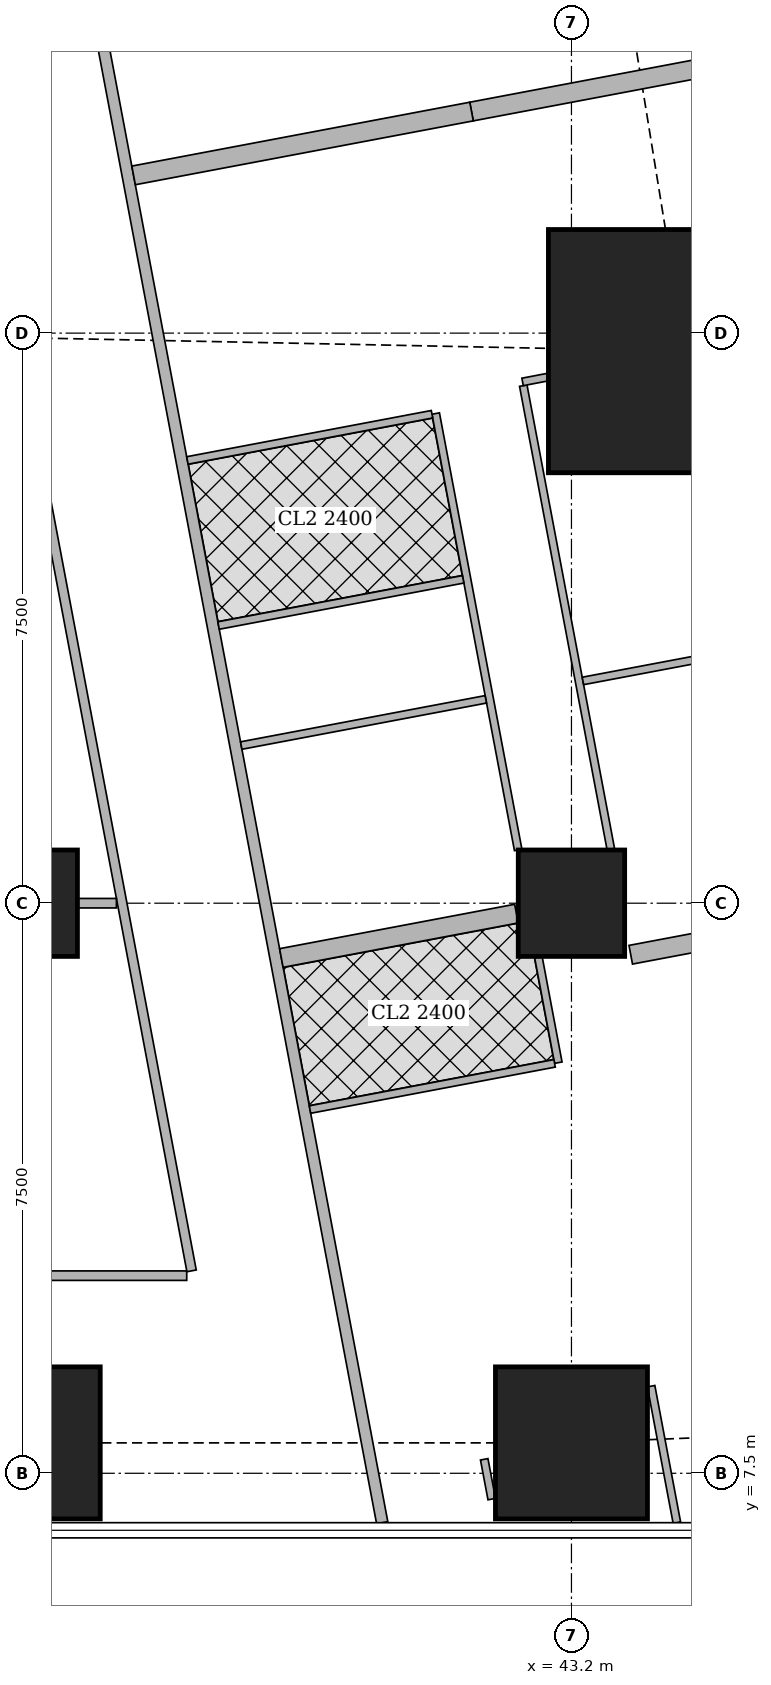
"""IFC4 building model, lengths in metres.
Left out: names, types, materials, properties, quantities, classifications, styles, units other than length and angle.
Written with IfcOpenShell. Run it as: python <this file> out.ifc"""

import sys

from ifc_helpers import new_model, si_unit, direction, frame, frame_2d, origin, origin_2d, place, context, subcontext, project, spatial, rectangle, extrude, element, fill, save


model = new_model("IFC4")
c1 = context("Model", 3, precision=1e-05, world=origin(), true_north=direction((0.0, 1.0)))
c2 = subcontext(c1, "Body", "Model", "MODEL_VIEW")
j1 = project(units=[si_unit("LENGTHUNIT", "METRE"), si_unit("PLANEANGLEUNIT", "RADIAN")], contexts=[c1])
p1 = place(None, origin())
s1 = spatial("IfcSite", under=j1, at=p1, CompositionType="ELEMENT")
p2 = place(p1, origin())
s2 = spatial("IfcBuilding", under=s1, at=p2, CompositionType="ELEMENT")
p3 = place(p2, frame((0.0, 0.0, 262.85)))
s3 = spatial("IfcBuildingStorey", under=s2, at=p3, CompositionType="ELEMENT", Elevation=262.85)
for number, where, z_axis, x_axis in (
    (1, (36.0, 7.9, 0.0), (0.0, 0.0, 1.0), (1.0, 0.0, 0.0)),
    (2, (43.2, 7.9, 0.0), (0.0, 0.0, 1.0), (1.0, 0.0, 0.0)),
):
    element("IfcColumn", number, at=place(p3, frame(where, z_axis=z_axis, x_axis=x_axis)), inside=s3, PredefinedType="COLUMN", context=c2, shape_type="SweptSolid", body=[
        extrude(rectangle(XDim=2.0, YDim=2.0, at=origin_2d()), origin(), (0.0, 0.0, 1.0), 3.75),
    ])
for number, where, z_axis, x_axis in (
    (3, (36.0, 15.0, 0.0), (0.0, 0.0, 1.0), (1.0, 0.0, 0.0)),
    (4, (43.2, 15.0, 0.0), (0.0, 0.0, 1.0), (1.0, 0.0, 0.0)),
):
    element("IfcColumn", number, at=place(p3, frame(where, z_axis=z_axis, x_axis=x_axis)), inside=s3, PredefinedType="COLUMN", context=c2, shape_type="SweptSolid", body=[
        extrude(rectangle(XDim=1.4, YDim=1.4, at=origin_2d()), origin(), (0.0, 0.0, 1.0), 3.75),
    ])
p4 = place(p3, frame((44.697, 22.263, 0.0), z_axis=(0.0, 0.0, 1.0), x_axis=(1.0, 0.0, 0.0)))
e5 = element("IfcColumn", 5, at=p4, inside=s3, PredefinedType="COLUMN", context=c2, shape_type="SweptSolid", body=[
    extrude(rectangle(XDim=3.6, YDim=3.2, at=origin_2d()), origin(), (0.0, 0.0, 1.0), 3.75),
])
p5 = place(p3, frame((49.684, 7.832, 0.0), z_axis=(0.0, 0.0, 1.0), x_axis=(-0.185616669694, 0.982622232565, 0.0)))
e6 = element("IfcWall", 6, at=p5, inside=s3, PredefinedType="SOLIDWALL", context=c2, shape_type="SweptSolid", body=[
    extrude(rectangle(XDim=36.0, YDim=0.2, at=frame_2d((18.0, 0.0))), origin(), (0.0, 0.0, 1.0), 3.5),
])
p6 = place(p5, frame((2.518, 0.0, 0.9)))
e7 = element("IfcOpeningElement", 7, at=p6, cuts=e6, PredefinedType="OPENING", context=c2, shape_type="SweptSolid", body=[
    extrude(rectangle(XDim=2.4, YDim=1.5, at=frame_2d((1.2, 0.75))), frame((0.0, 0.11, 0.0), z_axis=(0.0, -1.0, 0.0), x_axis=(1.0, 0.0, 0.0)), (0.0, 0.0, 1.0), 0.22),
])
p7 = place(p5, frame((8.444, 0.0, 0.9)))
e8 = element("IfcOpeningElement", 8, at=p7, cuts=e6, PredefinedType="OPENING", context=c2, shape_type="SweptSolid", body=[
    extrude(rectangle(XDim=1.8, YDim=1.5, at=frame_2d((0.9, 0.75))), frame((0.0, 0.11, 0.0), z_axis=(0.0, -1.0, 0.0), x_axis=(1.0, 0.0, 0.0)), (0.0, 0.0, 1.0), 0.22),
])
p8 = place(p5, frame((12.261, 0.0, 0.9)))
e9 = element("IfcOpeningElement", 9, at=p8, cuts=e6, PredefinedType="OPENING", context=c2, shape_type="SweptSolid", body=[
    extrude(rectangle(XDim=1.8, YDim=1.5, at=frame_2d((0.9, 0.75))), frame((0.0, 0.11, 0.0), z_axis=(0.0, -1.0, 0.0), x_axis=(1.0, 0.0, 0.0)), (0.0, 0.0, 1.0), 0.22),
])
p9 = place(p5, frame((16.078, 0.0, 0.9)))
e10 = element("IfcOpeningElement", 10, at=p9, cuts=e6, PredefinedType="OPENING", context=c2, shape_type="SweptSolid", body=[
    extrude(rectangle(XDim=1.8, YDim=1.5, at=frame_2d((0.9, 0.75))), frame((0.0, 0.11, 0.0), z_axis=(0.0, -1.0, 0.0), x_axis=(1.0, 0.0, 0.0)), (0.0, 0.0, 1.0), 0.22),
])
p10 = place(p5, frame((19.894, 0.0, 0.9)))
e11 = element("IfcOpeningElement", 11, at=p10, cuts=e6, PredefinedType="OPENING", context=c2, shape_type="SweptSolid", body=[
    extrude(rectangle(XDim=1.8, YDim=1.5, at=frame_2d((0.9, 0.75))), frame((0.0, 0.11, 0.0), z_axis=(0.0, -1.0, 0.0), x_axis=(1.0, 0.0, 0.0)), (0.0, 0.0, 1.0), 0.22),
])
p11 = place(p5, frame((23.71, 0.0, 0.9)))
e12 = element("IfcOpeningElement", 12, at=p11, cuts=e6, PredefinedType="OPENING", context=c2, shape_type="SweptSolid", body=[
    extrude(rectangle(XDim=1.8, YDim=1.5, at=frame_2d((0.9, 0.75))), frame((0.0, 0.11, 0.0), z_axis=(0.0, -1.0, 0.0), x_axis=(1.0, 0.0, 0.0)), (0.0, 0.0, 1.0), 0.22),
])
p12 = place(p5, frame((27.526, 0.0, 0.9)))
e13 = element("IfcOpeningElement", 13, at=p12, cuts=e6, PredefinedType="OPENING", context=c2, shape_type="SweptSolid", body=[
    extrude(rectangle(XDim=1.8, YDim=1.5, at=frame_2d((0.9, 0.75))), frame((0.0, 0.11, 0.0), z_axis=(0.0, -1.0, 0.0), x_axis=(1.0, 0.0, 0.0)), (0.0, 0.0, 1.0), 0.22),
])
p13 = place(p5, frame((32.046, 0.0, 0.9)))
e14 = element("IfcOpeningElement", 14, at=p13, cuts=e6, PredefinedType="OPENING", context=c2, shape_type="SweptSolid", body=[
    extrude(rectangle(XDim=1.8, YDim=1.5, at=frame_2d((0.9, 0.75))), frame((0.0, 0.11, 0.0), z_axis=(0.0, -1.0, 0.0), x_axis=(1.0, 0.0, 0.0)), (0.0, 0.0, 1.0), 0.22),
])
p14 = place(p3, frame((34.036, 42.186, 0.0), z_axis=(0.0, 0.0, 1.0), x_axis=(0.185593518645, -0.9826266055, 0.0)))
e15 = element("IfcWall", 15, at=p14, inside=s3, PredefinedType="SOLIDWALL", context=c2, shape_type="SweptSolid", body=[
    extrude(rectangle(XDim=35.961, YDim=0.15, at=frame_2d((17.98, 0.0))), origin(), (0.0, 0.0, 1.0), 2.5),
])
p15 = place(p14, frame((15.529, 0.0, 0.0)))
e16 = element("IfcOpeningElement", 16, at=p15, cuts=e15, PredefinedType="OPENING", context=c2, shape_type="SweptSolid", body=[
    extrude(rectangle(XDim=1.0, YDim=2.1, at=frame_2d((0.5, 1.05))), frame((0.0, 0.085, 0.0), z_axis=(0.0, -1.0, 0.0), x_axis=(1.0, 0.0, 0.0)), (0.0, 0.0, 1.0), 0.17),
])
p16 = place(p14, frame((19.345, 0.0, 0.0)))
e17 = element("IfcOpeningElement", 17, at=p16, cuts=e15, PredefinedType="OPENING", context=c2, shape_type="SweptSolid", body=[
    extrude(rectangle(XDim=1.0, YDim=2.1, at=frame_2d((0.5, 1.05))), frame((0.0, 0.085, 0.0), z_axis=(0.0, -1.0, 0.0), x_axis=(1.0, 0.0, 0.0)), (0.0, 0.0, 1.0), 0.17),
])
p17 = place(p14, frame((30.594, 0.0, 0.0)))
e18 = element("IfcOpeningElement", 18, at=p17, cuts=e15, PredefinedType="OPENING", context=c2, shape_type="SweptSolid", body=[
    extrude(rectangle(XDim=1.0, YDim=2.1, at=frame_2d((0.5, 1.05))), frame((0.0, 0.085, 0.0), z_axis=(0.0, -1.0, 0.0), x_axis=(1.0, 0.0, 0.0)), (0.0, 0.0, 1.0), 0.17),
])
p18 = place(p3, frame((44.248, 8.646, 0.0), z_axis=(0.0, 0.0, 1.0), x_axis=(0.185417594585, -0.982659816833, 0.0)))
e19 = element("IfcWall", 19, at=p18, inside=s3, PredefinedType="PARTITIONING", context=c2, shape_type="SweptSolid", body=[
    extrude(rectangle(XDim=1.828, YDim=0.1, at=frame_2d((0.914, 0.0))), origin(), (0.0, 0.0, 1.0), 2.05),
])
p19 = place(p3, frame((42.151, 7.16, 0.0), z_axis=(0.0, 0.0, 1.0), x_axis=(-0.185366164644, 0.982669519729, 0.0)))
e20 = element("IfcWall", 20, at=p19, inside=s3, PredefinedType="PARTITIONING", context=c2, shape_type="SweptSolid", body=[
    extrude(rectangle(XDim=0.533, YDim=0.1, at=frame_2d((0.267, 0.0))), origin(), (0.0, 0.0, 1.0), 2.5),
])
p20 = place(p3, frame((42.566, 21.809, 0.0), z_axis=(0.0, 0.0, 1.0), x_axis=(0.185613526435, -0.98262282632, 0.0)))
e21 = element("IfcWall", 21, at=p20, inside=s3, PredefinedType="PARTITIONING", context=c2, shape_type="SweptSolid", body=[
    extrude(rectangle(XDim=6.207, YDim=0.1, at=frame_2d((3.104, 0.0))), origin(), (0.0, 0.0, 1.0), 2.5),
])
p21 = place(p20, frame((1.45, 0.0, 0.0)))
e22 = element("IfcOpeningElement", 22, at=p21, cuts=e21, PredefinedType="OPENING", context=c2, shape_type="SweptSolid", body=[
    extrude(rectangle(XDim=0.9, YDim=2.1, at=frame_2d((0.45, 1.05))), frame((0.0, 0.06, 0.0), z_axis=(0.0, -1.0, 0.0), x_axis=(1.0, 0.0, 0.0)), (0.0, 0.0, 1.0), 0.12),
])
p22 = place(p20, frame((4.163, 0.0, 0.0)))
e23 = element("IfcOpeningElement", 23, at=p22, cuts=e21, PredefinedType="OPENING", context=c2, shape_type="SweptSolid", body=[
    extrude(rectangle(XDim=0.9, YDim=2.1, at=frame_2d((0.45, 1.05))), frame((0.0, 0.06, 0.0), z_axis=(0.0, -1.0, 0.0), x_axis=(1.0, 0.0, 0.0)), (0.0, 0.0, 1.0), 0.12),
])
p23 = place(p3, frame((41.414, 21.442, 0.0), z_axis=(0.0, 0.0, 1.0), x_axis=(0.185698675093, -0.982606738257, 0.0)))
e24 = element("IfcWall", 24, at=p23, inside=s3, PredefinedType="PARTITIONING", context=c2, shape_type="SweptSolid", body=[
    extrude(rectangle(XDim=5.843, YDim=0.1, at=frame_2d((2.921, 0.0))), origin(), (0.0, 0.0, 1.0), 3.5),
])
p24 = place(p23, frame((0.655, 0.0, 0.0)))
e25 = element("IfcOpeningElement", 25, at=p24, cuts=e24, PredefinedType="OPENING", context=c2, shape_type="SweptSolid", body=[
    extrude(rectangle(XDim=0.9, YDim=2.1, at=frame_2d((0.45, 1.05))), frame((0.0, 0.06, 0.0), z_axis=(0.0, -1.0, 0.0), x_axis=(1.0, 0.0, 0.0)), (0.0, 0.0, 1.0), 0.12),
])
p25 = place(p23, frame((2.563, 0.0, 0.0)))
e26 = element("IfcOpeningElement", 26, at=p25, cuts=e24, PredefinedType="OPENING", context=c2, shape_type="SweptSolid", body=[
    extrude(rectangle(XDim=0.9, YDim=2.1, at=frame_2d((0.45, 1.05))), frame((0.0, 0.06, 0.0), z_axis=(0.0, -1.0, 0.0), x_axis=(1.0, 0.0, 0.0)), (0.0, 0.0, 1.0), 0.12),
])
p26 = place(p3, frame((42.887, 21.921, 0.0), z_axis=(0.0, 0.0, 1.0), x_axis=(-0.982274918032, -0.187445953293, 0.0)))
e27 = element("IfcWall", 27, at=p26, inside=s3, PredefinedType="PARTITIONING", context=c2, shape_type="SweptSolid", body=[
    extrude(rectangle(XDim=0.336, YDim=0.1, at=frame_2d((0.168, 0.0))), origin(), (0.0, 0.0, 1.0), 2.5),
])
p27 = place(p3, frame((47.527, 18.712, 0.0), z_axis=(0.0, 0.0, 1.0), x_axis=(-0.982665405803, -0.185387972203, 0.0)))
e28 = element("IfcWall", 28, at=p27, inside=s3, PredefinedType="PARTITIONING", context=c2, shape_type="SweptSolid", body=[
    extrude(rectangle(XDim=4.25, YDim=0.1, at=frame_2d((2.125, 0.0))), origin(), (0.0, 0.0, 1.0), 2.5),
])
p28 = place(p3, frame((41.365, 21.433, 0.0), z_axis=(0.0, 0.0, 1.0), x_axis=(-0.982607026909, -0.185697147715, 0.0)))
e29 = element("IfcWall", 29, at=p28, inside=s3, PredefinedType="PARTITIONING", context=c2, shape_type="SweptSolid", body=[
    extrude(rectangle(XDim=3.275, YDim=0.1, at=frame_2d((1.637, 0.0))), origin(), (0.0, 0.0, 1.0), 3.5),
])
p29 = place(p3, frame((42.073, 17.682, 0.0), z_axis=(0.0, 0.0, 1.0), x_axis=(-0.982620626894, -0.185625169636, 0.0)))
e30 = element("IfcWall", 30, at=p29, inside=s3, PredefinedType="PARTITIONING", context=c2, shape_type="SweptSolid", body=[
    extrude(rectangle(XDim=3.275, YDim=0.1, at=frame_2d((1.637, 0.0))), origin(), (0.0, 0.0, 1.0), 3.5),
])
p30 = place(p29, frame((1.2, 0.0, 0.0)))
e31 = element("IfcOpeningElement", 31, at=p30, cuts=e30, PredefinedType="OPENING", context=c2, shape_type="SweptSolid", body=[
    extrude(rectangle(XDim=0.9, YDim=2.1, at=frame_2d((0.45, 1.05))), frame((0.0, 0.06, 0.0), z_axis=(0.0, -1.0, 0.0), x_axis=(1.0, 0.0, 0.0)), (0.0, 0.0, 1.0), 0.12),
])
p31 = place(p3, frame((41.775, 19.261, 0.0), z_axis=(0.0, 0.0, 1.0), x_axis=(-0.982620626894, -0.185625169636, 0.0)))
e32 = element("IfcWall", 32, at=p31, inside=s3, PredefinedType="PARTITIONING", context=c2, shape_type="SweptSolid", body=[
    extrude(rectangle(XDim=3.275, YDim=0.1, at=frame_2d((1.637, 0.0))), origin(), (0.0, 0.0, 1.0), 3.5),
])
p32 = place(p3, frame((46.11, 26.213, 0.0), z_axis=(0.0, 0.0, 1.0), x_axis=(-0.982633535512, -0.185556823879, 0.0)))
e33 = element("IfcWall", 33, at=p32, inside=s3, PredefinedType="SOLIDWALL", context=c2, shape_type="SweptSolid", body=[
    extrude(rectangle(XDim=4.3, YDim=0.25, at=frame_2d((2.15, 0.0))), origin(), (0.0, 0.0, 1.0), 2.5),
])
p33 = place(p3, frame((41.885, 25.415, 0.0), z_axis=(0.0, 0.0, 1.0), x_axis=(-0.982612837616, -0.185666398014, 0.0)))
e34 = element("IfcWall", 34, at=p33, inside=s3, PredefinedType="SOLIDWALL", context=c2, shape_type="SweptSolid", body=[
    extrude(rectangle(XDim=4.525, YDim=0.25, at=frame_2d((2.262, 0.0))), origin(), (0.0, 0.0, 1.0), 3.5),
])
p34 = place(p3, frame((42.765, 14.29, 0.0), z_axis=(0.0, 0.0, 1.0), x_axis=(0.185634589628, -0.982618847333, 0.0)))
e35 = element("IfcWall", 35, at=p34, inside=s3, PredefinedType="PARTITIONING", context=c2, shape_type="SweptSolid", body=[
    extrude(rectangle(XDim=1.413, YDim=0.1, at=frame_2d((0.706, 0.0))), origin(), (0.0, 0.0, 1.0), 3.5),
])
p35 = place(p3, frame((42.978, 12.893, 0.0), z_axis=(0.0, 0.0, 1.0), x_axis=(-0.982607026909, -0.185697147715, 0.0)))
e36 = element("IfcWall", 36, at=p35, inside=s3, PredefinedType="PARTITIONING", context=c2, shape_type="SweptSolid", body=[
    extrude(rectangle(XDim=3.275, YDim=0.1, at=frame_2d((1.637, 0.0))), origin(), (0.0, 0.0, 1.0), 3.5),
])
p36 = place(p35, frame((1.2, 0.0, 0.0)))
e37 = element("IfcOpeningElement", 37, at=p36, cuts=e36, PredefinedType="OPENING", context=c2, shape_type="SweptSolid", body=[
    extrude(rectangle(XDim=0.9, YDim=2.1, at=frame_2d((0.45, 1.05))), frame((0.0, 0.06, 0.0), z_axis=(0.0, -1.0, 0.0), x_axis=(1.0, 0.0, 0.0)), (0.0, 0.0, 1.0), 0.12),
])
p37 = place(p3, frame((45.29, 14.569, 0.0), z_axis=(0.0, 0.0, 1.0), x_axis=(-0.982676759201, -0.185327782391, 0.0)))
e38 = element("IfcWall", 38, at=p37, inside=s3, PredefinedType="SOLIDWALL", context=c2, shape_type="SweptSolid", body=[
    extrude(rectangle(XDim=1.333, YDim=0.25, at=frame_2d((0.667, 0.0))), origin(), (0.0, 0.0, 1.0), 3.5),
])
p38 = place(p3, frame((42.476, 14.863, 0.0), z_axis=(0.0, 0.0, 1.0), x_axis=(-0.982638716117, -0.185529387398, 0.0)))
e39 = element("IfcWall", 39, at=p38, inside=s3, PredefinedType="SOLIDWALL", context=c2, shape_type="SweptSolid", body=[
    extrude(rectangle(XDim=3.148, YDim=0.25, at=frame_2d((1.574, 0.0))), origin(), (0.0, 0.0, 1.0), 3.5),
])
p39 = place(p3, frame((28.95, 10.1, 0.0), z_axis=(0.0, 0.0, 1.0), x_axis=(1.0, 0.0, 0.0)))
e40 = element("IfcWall", 40, at=p39, inside=s3, PredefinedType="PARTITIONING", context=c2, shape_type="SweptSolid", body=[
    extrude(rectangle(XDim=9.188, YDim=0.125, at=frame_2d((4.594, 0.0))), origin(), (0.0, 0.0, 1.0), 3.5),
])
p40 = place(p3, frame((38.202, 10.163, 0.0), z_axis=(0.0, 0.0, 1.0), x_axis=(-0.185610321132, 0.982623431783, 0.0)))
e41 = element("IfcWall", 41, at=p40, inside=s3, PredefinedType="PARTITIONING", context=c2, shape_type="SweptSolid", body=[
    extrude(rectangle(XDim=25.111, YDim=0.125, at=frame_2d((12.556, 0.0))), origin(), (0.0, 0.0, 1.0), 2.5),
])
p41 = place(p40, frame((0.708, 0.0, 0.0)))
e42 = element("IfcOpeningElement", 42, at=p41, cuts=e41, PredefinedType="OPENING", context=c2, shape_type="SweptSolid", body=[
    extrude(rectangle(XDim=1.0, YDim=2.1, at=frame_2d((0.5, 1.05))), frame((0.0, 0.073, 0.0), z_axis=(0.0, -1.0, 0.0), x_axis=(1.0, 0.0, 0.0)), (0.0, 0.0, 1.0), 0.145),
])
p42 = place(p40, frame((5.9, 0.0, 0.0)))
e43 = element("IfcOpeningElement", 43, at=p42, cuts=e41, PredefinedType="OPENING", context=c2, shape_type="SweptSolid", body=[
    extrude(rectangle(XDim=1.0, YDim=2.1, at=frame_2d((0.5, 1.05))), frame((0.0, 0.073, 0.0), z_axis=(0.0, -1.0, 0.0), x_axis=(1.0, 0.0, 0.0)), (0.0, 0.0, 1.0), 0.145),
])
p43 = place(p40, frame((13.378, 0.0, 0.0)))
e44 = element("IfcOpeningElement", 44, at=p43, cuts=e41, PredefinedType="OPENING", context=c2, shape_type="SweptSolid", body=[
    extrude(rectangle(XDim=1.0, YDim=2.1, at=frame_2d((0.5, 1.05))), frame((0.0, 0.073, 0.0), z_axis=(0.0, -1.0, 0.0), x_axis=(1.0, 0.0, 0.0)), (0.0, 0.0, 1.0), 0.145),
])
p44 = place(p40, frame((17.194, 0.0, 0.0)))
e45 = element("IfcOpeningElement", 45, at=p44, cuts=e41, PredefinedType="OPENING", context=c2, shape_type="SweptSolid", body=[
    extrude(rectangle(XDim=1.0, YDim=2.1, at=frame_2d((0.5, 1.05))), frame((0.0, 0.073, 0.0), z_axis=(0.0, -1.0, 0.0), x_axis=(1.0, 0.0, 0.0)), (0.0, 0.0, 1.0), 0.145),
])
p45 = place(p40, frame((21.15, 0.0, 0.0)))
e46 = element("IfcOpeningElement", 46, at=p45, cuts=e41, PredefinedType="OPENING", context=c2, shape_type="SweptSolid", body=[
    extrude(rectangle(XDim=1.0, YDim=2.1, at=frame_2d((0.5, 1.05))), frame((0.0, 0.073, 0.0), z_axis=(0.0, -1.0, 0.0), x_axis=(1.0, 0.0, 0.0)), (0.0, 0.0, 1.0), 0.145),
])
p46 = place(p3, frame((36.701, 15.0, 0.0), z_axis=(0.0, 0.0, 1.0), x_axis=(1.0, 0.0, 0.0)))
e47 = element("IfcWall", 47, at=p46, inside=s3, PredefinedType="PARTITIONING", context=c2, shape_type="SweptSolid", body=[
    extrude(rectangle(XDim=0.512, YDim=0.125, at=frame_2d((0.256, 0.0))), origin(), (0.0, 0.0, 1.0), 3.5),
])
p47 = place(p15, origin())
e48 = element("IfcDoor", 48, at=p47, inside=s3, OperationType="SINGLE_SWING_LEFT", PredefinedType="DOOR", context=c2, shape_type="SweptSolid", body=[
    extrude(rectangle(XDim=1.0, YDim=2.1, at=frame_2d((0.5, 1.05))), frame((0.0, 0.025, 0.0), z_axis=(0.0, -1.0, 0.0), x_axis=(1.0, 0.0, 0.0)), (0.0, 0.0, 1.0), 0.05),
])
fill(e16, e48)
p48 = place(p21, origin())
e49 = element("IfcDoor", 49, at=p48, inside=s3, OperationType="SINGLE_SWING_LEFT", PredefinedType="DOOR", context=c2, shape_type="SweptSolid", body=[
    extrude(rectangle(XDim=0.9, YDim=2.1, at=frame_2d((0.45, 1.05))), frame((0.0, 0.025, 0.0), z_axis=(0.0, -1.0, 0.0), x_axis=(1.0, 0.0, 0.0)), (0.0, 0.0, 1.0), 0.05),
])
fill(e22, e49)
p49 = place(p22, origin())
e50 = element("IfcDoor", 50, at=p49, inside=s3, OperationType="SINGLE_SWING_LEFT", PredefinedType="DOOR", context=c2, shape_type="SweptSolid", body=[
    extrude(rectangle(XDim=0.9, YDim=2.1, at=frame_2d((0.45, 1.05))), frame((0.0, 0.025, 0.0), z_axis=(0.0, -1.0, 0.0), x_axis=(1.0, 0.0, 0.0)), (0.0, 0.0, 1.0), 0.05),
])
fill(e23, e50)
p50 = place(p24, origin())
e51 = element("IfcDoor", 51, at=p50, inside=s3, OperationType="SINGLE_SWING_RIGHT", PredefinedType="DOOR", context=c2, shape_type="SweptSolid", body=[
    extrude(rectangle(XDim=0.9, YDim=2.1, at=frame_2d((0.45, 1.05))), frame((0.0, 0.025, 0.0), z_axis=(0.0, -1.0, 0.0), x_axis=(1.0, 0.0, 0.0)), (0.0, 0.0, 1.0), 0.05),
])
fill(e25, e51)
p51 = place(p25, origin())
e52 = element("IfcDoor", 52, at=p51, inside=s3, OperationType="SINGLE_SWING_RIGHT", PredefinedType="DOOR", context=c2, shape_type="SweptSolid", body=[
    extrude(rectangle(XDim=0.9, YDim=2.1, at=frame_2d((0.45, 1.05))), frame((0.0, 0.025, 0.0), z_axis=(0.0, -1.0, 0.0), x_axis=(1.0, 0.0, 0.0)), (0.0, 0.0, 1.0), 0.05),
])
fill(e26, e52)
p52 = place(p16, origin())
e53 = element("IfcDoor", 53, at=p52, inside=s3, OperationType="SINGLE_SWING_RIGHT", PredefinedType="DOOR", context=c2, shape_type="SweptSolid", body=[
    extrude(rectangle(XDim=1.0, YDim=2.1, at=frame_2d((0.5, 1.05))), frame((0.0, 0.025, 0.0), z_axis=(0.0, -1.0, 0.0), x_axis=(1.0, 0.0, 0.0)), (0.0, 0.0, 1.0), 0.05),
])
fill(e17, e53)
p53 = place(p36, origin())
e54 = element("IfcDoor", 54, at=p53, inside=s3, OperationType="SINGLE_SWING_RIGHT", PredefinedType="DOOR", context=c2, shape_type="SweptSolid", body=[
    extrude(rectangle(XDim=0.9, YDim=2.1, at=frame_2d((0.45, 1.05))), frame((0.0, 0.025, 0.0), z_axis=(0.0, -1.0, 0.0), x_axis=(1.0, 0.0, 0.0)), (0.0, 0.0, 1.0), 0.05),
])
fill(e37, e54)
p54 = place(p17, origin())
e55 = element("IfcDoor", 55, at=p54, inside=s3, OperationType="SINGLE_SWING_LEFT", PredefinedType="DOOR", context=c2, shape_type="SweptSolid", body=[
    extrude(rectangle(XDim=1.0, YDim=2.1, at=frame_2d((0.5, 1.05))), frame((0.0, 0.025, 0.0), z_axis=(0.0, -1.0, 0.0), x_axis=(1.0, 0.0, 0.0)), (0.0, 0.0, 1.0), 0.05),
])
fill(e18, e55)
p55 = place(p30, origin())
e56 = element("IfcDoor", 56, at=p55, inside=s3, OperationType="SINGLE_SWING_RIGHT", PredefinedType="DOOR", context=c2, shape_type="SweptSolid", body=[
    extrude(rectangle(XDim=0.9, YDim=2.1, at=frame_2d((0.45, 1.05))), frame((0.0, 0.025, 0.0), z_axis=(0.0, -1.0, 0.0), x_axis=(1.0, 0.0, 0.0)), (0.0, 0.0, 1.0), 0.05),
])
fill(e31, e56)
p56 = place(p41, origin())
e57 = element("IfcDoor", 57, at=p56, inside=s3, OperationType="SINGLE_SWING_LEFT", PredefinedType="DOOR", context=c2, shape_type="SweptSolid", body=[
    extrude(rectangle(XDim=1.0, YDim=2.1, at=frame_2d((0.5, 1.05))), frame((0.0, 0.025, 0.0), z_axis=(0.0, -1.0, 0.0), x_axis=(1.0, 0.0, 0.0)), (0.0, 0.0, 1.0), 0.05),
])
fill(e42, e57)
p57 = place(p42, origin())
e58 = element("IfcDoor", 58, at=p57, inside=s3, OperationType="SINGLE_SWING_LEFT", PredefinedType="DOOR", context=c2, shape_type="SweptSolid", body=[
    extrude(rectangle(XDim=1.0, YDim=2.1, at=frame_2d((0.5, 1.05))), frame((0.0, 0.025, 0.0), z_axis=(0.0, -1.0, 0.0), x_axis=(1.0, 0.0, 0.0)), (0.0, 0.0, 1.0), 0.05),
])
fill(e43, e58)
save(model, sys.argv[1])
